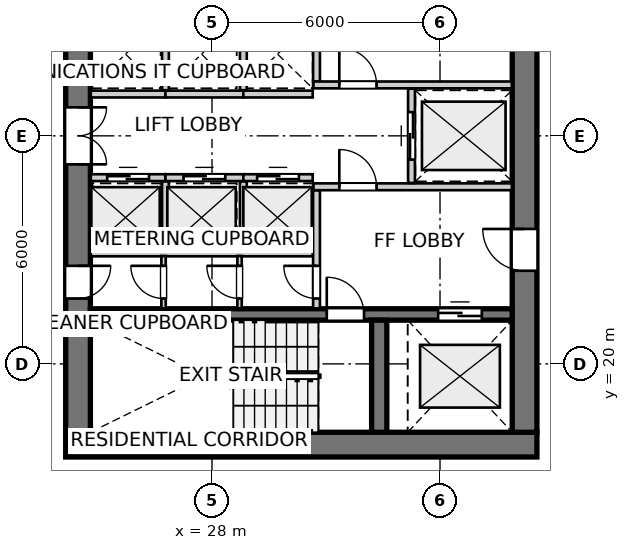
"""IFC4 building model, lengths in metres.
Left out: names, types, materials, properties, quantities, classifications, styles, units other than length and angle.
Written with IfcOpenShell. Run it as: python <this file> out.ifc"""

import sys

from ifc_helpers import new_model, si_unit, direction, frame, frame_2d, origin, place, context, subcontext, project, spatial, rectangle, extrude, source, transform, mapped, element, fill, save


model = new_model("IFC4")
c1 = context("Model", 3, precision=1e-05, world=origin(), true_north=direction((0.0, 1.0)))
c2 = subcontext(c1, "Body", "Model", "MODEL_VIEW")
j1 = project(units=[si_unit("LENGTHUNIT", "METRE"), si_unit("PLANEANGLEUNIT", "RADIAN")], contexts=[c1])
p1 = place(None, origin())
s1 = spatial("IfcSite", under=j1, at=p1, CompositionType="ELEMENT")
p2 = place(p1, origin())
s2 = spatial("IfcBuilding", under=s1, at=p2, CompositionType="ELEMENT")
p3 = place(p2, frame((0.0, 0.0, 89.6)))
s3 = spatial("IfcBuildingStorey", under=s2, at=p3, CompositionType="ELEMENT", Elevation=89.6)
p4 = place(p3, frame((24.15, 17.875, 0.0), z_axis=(0.0, 0.0, 1.0), x_axis=(1.0, 0.0, 0.0)))
e1 = element("IfcWall", 1, at=p4, inside=s3, PredefinedType="SHEAR", context=c2, shape_type="SweptSolid", body=[
    extrude(rectangle(XDim=12.4, YDim=0.65, at=frame_2d((6.2, 0.0))), origin(), (0.0, 0.0, 1.0), 2.95),
])
p5 = place(p3, frame((24.475, 33.8, 0.0), z_axis=(0.0, 0.0, 1.0), x_axis=(0.0, -1.0, 0.0)))
e2 = element("IfcWall", 2, at=p5, inside=s3, PredefinedType="SHEAR", context=c2, shape_type="SweptSolid", body=[
    extrude(rectangle(XDim=15.6, YDim=0.65, at=frame_2d((7.8, 0.0))), origin(), (0.0, 0.0, 1.0), 2.95),
])
p6 = place(p5, frame((7.05, 0.0, 0.0)))
e3 = element("IfcOpeningElement", 3, at=p6, cuts=e2, PredefinedType="OPENING", context=c2, shape_type="SweptSolid", body=[
    extrude(rectangle(XDim=1.5, YDim=2.15, at=frame_2d((0.75, 1.075))), frame((0.0, 0.335, 0.0), z_axis=(0.0, -1.0, 0.0), x_axis=(1.0, 0.0, 0.0)), (0.0, 0.0, 1.0), 0.67),
])
p7 = place(p5, frame((3.52, 0.0, 0.0)))
e4 = element("IfcOpeningElement", 4, at=p7, cuts=e2, PredefinedType="OPENING", context=c2, shape_type="SweptSolid", body=[
    extrude(rectangle(XDim=0.86, YDim=2.05, at=frame_2d((0.43, 1.025))), frame((0.0, 0.335, 0.0), z_axis=(0.0, -1.0, 0.0), x_axis=(1.0, 0.0, 0.0)), (0.0, 0.0, 1.0), 0.67),
])
p8 = place(p5, frame((11.22, 0.0, 0.0)))
e5 = element("IfcOpeningElement", 5, at=p8, cuts=e2, PredefinedType="OPENING", context=c2, shape_type="SweptSolid", body=[
    extrude(rectangle(XDim=0.86, YDim=2.05, at=frame_2d((0.43, 1.025))), frame((0.0, 0.335, 0.0), z_axis=(0.0, -1.0, 0.0), x_axis=(1.0, 0.0, 0.0)), (0.0, 0.0, 1.0), 0.67),
])
p9 = place(p3, frame((36.225, 18.2, 0.0), z_axis=(0.0, 0.0, 1.0), x_axis=(0.0, 1.0, 0.0)))
e6 = element("IfcWall", 6, at=p9, inside=s3, PredefinedType="SHEAR", context=c2, shape_type="SweptSolid", body=[
    extrude(rectangle(XDim=15.6, YDim=0.65, at=frame_2d((7.8, 0.0))), origin(), (0.0, 0.0, 1.0), 2.95),
])
p10 = place(p9, frame((4.25, 0.0, 0.0)))
e7 = element("IfcOpeningElement", 7, at=p10, cuts=e6, PredefinedType="OPENING", context=c2, shape_type="SweptSolid", body=[
    extrude(rectangle(XDim=1.1, YDim=2.15, at=frame_2d((0.55, 1.075))), frame((0.0, 0.335, 0.0), z_axis=(0.0, -1.0, 0.0), x_axis=(1.0, 0.0, 0.0)), (0.0, 0.0, 1.0), 0.67),
])
p11 = place(p9, frame((10.25, 0.0, 0.0)))
e8 = element("IfcOpeningElement", 8, at=p11, cuts=e6, PredefinedType="OPENING", context=c2, shape_type="SweptSolid", body=[
    extrude(rectangle(XDim=1.1, YDim=2.15, at=frame_2d((0.55, 1.075))), frame((0.0, 0.335, 0.0), z_axis=(0.0, -1.0, 0.0), x_axis=(1.0, 0.0, 0.0)), (0.0, 0.0, 1.0), 0.67),
])
p12 = place(p3, frame((24.8, 21.3, 0.0), z_axis=(0.0, 0.0, 1.0), x_axis=(1.0, 0.0, 0.0)))
e9 = element("IfcWall", 9, at=p12, inside=s3, PredefinedType="SHEAR", context=c2, shape_type="SweptSolid", body=[
    extrude(rectangle(XDim=11.1, YDim=0.3, at=frame_2d((5.55, 0.0))), origin(), (0.0, 0.0, 1.0), 2.95),
])
p13 = place(p12, frame((6.22, 0.0, 0.0)))
e10 = element("IfcOpeningElement", 10, at=p13, cuts=e9, PredefinedType="OPENING", context=c2, shape_type="SweptSolid", body=[
    extrude(rectangle(XDim=0.98, YDim=2.15, at=frame_2d((0.49, 1.075))), frame((0.0, 0.16, 0.0), z_axis=(0.0, -1.0, 0.0), x_axis=(1.0, 0.0, 0.0)), (0.0, 0.0, 1.0), 0.32),
])
p14 = place(p12, frame((9.15, 0.0, 0.0)))
e11 = element("IfcOpeningElement", 11, at=p14, cuts=e9, PredefinedType="OPENING", context=c2, shape_type="SweptSolid", body=[
    extrude(rectangle(XDim=1.15, YDim=2.15, at=frame_2d((0.575, 1.075))), frame((0.0, 0.16, 0.0), z_axis=(0.0, -1.0, 0.0), x_axis=(1.0, 0.0, 0.0)), (0.0, 0.0, 1.0), 0.32),
])
p15 = place(p3, frame((32.4, 18.2, 0.0), z_axis=(0.0, 0.0, 1.0), x_axis=(0.0, 1.0, 0.0)))
e12 = element("IfcWall", 12, at=p15, inside=s3, PredefinedType="SHEAR", context=c2, shape_type="SweptSolid", body=[
    extrude(rectangle(XDim=2.95, YDim=0.4, at=frame_2d((1.475, 0.0))), origin(), (0.0, 0.0, 1.0), 2.95),
])
p16 = place(p3, frame((30.75, 21.46, 0.0), z_axis=(0.0, 0.0, 1.0), x_axis=(0.0, 1.0, 0.0)))
e13 = element("IfcWall", 13, at=p16, inside=s3, PredefinedType="PARTITIONING", context=c2, shape_type="SweptSolid", body=[
    extrude(rectangle(XDim=3.11, YDim=0.18, at=frame_2d((1.555, 0.0))), origin(), (0.0, 0.0, 1.0), 2.95),
])
p17 = place(p16, frame((0.26, 0.0, 0.0)))
e14 = element("IfcOpeningElement", 14, at=p17, cuts=e13, PredefinedType="OPENING", context=c2, shape_type="SweptSolid", body=[
    extrude(rectangle(XDim=0.86, YDim=2.05, at=frame_2d((0.43, 1.025))), frame((0.0, 0.1, 0.0), z_axis=(0.0, -1.0, 0.0), x_axis=(1.0, 0.0, 0.0)), (0.0, 0.0, 1.0), 0.2),
])
p18 = place(p3, frame((30.67, 24.66, 0.0), z_axis=(0.0, 0.0, 1.0), x_axis=(1.0, 0.0, 0.0)))
e15 = element("IfcWall", 15, at=p18, inside=s3, PredefinedType="PARTITIONING", context=c2, shape_type="SweptSolid", body=[
    extrude(rectangle(XDim=5.22, YDim=0.18, at=frame_2d((2.61, 0.0))), origin(), (0.0, 0.0, 1.0), 2.95),
])
p19 = place(p18, frame((0.68, 0.0, 0.0)))
e16 = element("IfcOpeningElement", 16, at=p19, cuts=e15, PredefinedType="OPENING", context=c2, shape_type="SweptSolid", body=[
    extrude(rectangle(XDim=0.98, YDim=2.15, at=frame_2d((0.49, 1.075))), frame((0.0, 0.1, 0.0), z_axis=(0.0, -1.0, 0.0), x_axis=(1.0, 0.0, 0.0)), (0.0, 0.0, 1.0), 0.2),
])
p20 = place(p3, frame((30.75, 27.43, 0.0), z_axis=(0.0, 0.0, 1.0), x_axis=(0.0, 1.0, 0.0)))
e17 = element("IfcWall", 17, at=p20, inside=s3, PredefinedType="PARTITIONING", context=c2, shape_type="SweptSolid", body=[
    extrude(rectangle(XDim=3.11, YDim=0.18, at=frame_2d((1.555, 0.0))), origin(), (0.0, 0.0, 1.0), 2.95),
])
p21 = place(p20, frame((1.98, 0.0, 0.0)))
e18 = element("IfcOpeningElement", 18, at=p21, cuts=e17, PredefinedType="OPENING", context=c2, shape_type="SweptSolid", body=[
    extrude(rectangle(XDim=0.86, YDim=2.05, at=frame_2d((0.43, 1.025))), frame((0.0, 0.1, 0.0), z_axis=(0.0, -1.0, 0.0), x_axis=(1.0, 0.0, 0.0)), (0.0, 0.0, 1.0), 0.2),
])
p22 = place(p3, frame((30.67, 27.34, 0.0), z_axis=(0.0, 0.0, 1.0), x_axis=(1.0, 0.0, 0.0)))
e19 = element("IfcWall", 19, at=p22, inside=s3, PredefinedType="PARTITIONING", context=c2, shape_type="SweptSolid", body=[
    extrude(rectangle(XDim=5.22, YDim=0.18, at=frame_2d((2.61, 0.0))), origin(), (0.0, 0.0, 1.0), 2.95),
])
p23 = place(p22, frame((0.68, 0.0, 0.0)))
e20 = element("IfcOpeningElement", 20, at=p23, cuts=e19, PredefinedType="OPENING", context=c2, shape_type="SweptSolid", body=[
    extrude(rectangle(XDim=0.98, YDim=2.15, at=frame_2d((0.49, 1.075))), frame((0.0, 0.1, 0.0), z_axis=(0.0, -1.0, 0.0), x_axis=(1.0, 0.0, 0.0)), (0.0, 0.0, 1.0), 0.2),
])
p24 = place(p3, frame((33.25, 24.76, 0.0), z_axis=(0.0, 0.0, 1.0), x_axis=(0.0, 1.0, 0.0)))
e21 = element("IfcWall", 21, at=p24, inside=s3, PredefinedType="PARTITIONING", context=c2, shape_type="SweptSolid", body=[
    extrude(rectangle(XDim=2.48, YDim=0.18, at=frame_2d((1.24, 0.0))), origin(), (0.0, 0.0, 1.0), 2.95),
])
p25 = place(p24, frame((0.615, 0.0, 0.0)))
e22 = element("IfcOpeningElement", 22, at=p25, cuts=e21, PredefinedType="OPENING", context=c2, shape_type="SweptSolid", body=[
    extrude(rectangle(XDim=1.25, YDim=2.15, at=frame_2d((0.625, 1.075))), frame((0.0, 0.1, 0.0), z_axis=(0.0, -1.0, 0.0), x_axis=(1.0, 0.0, 0.0)), (0.0, 0.0, 1.0), 0.2),
])
p26 = place(p3, frame((24.81, 22.92, 0.0), z_axis=(0.0, 0.0, 1.0), x_axis=(1.0, 0.0, 0.0)))
e23 = element("IfcWall", 23, at=p26, inside=s3, PredefinedType="PARTITIONING", context=c2, shape_type="SweptSolid", body=[
    extrude(rectangle(XDim=5.84, YDim=0.18, at=frame_2d((2.92, 0.0))), origin(), (0.0, 0.0, 1.0), 2.95),
])
p27 = place(p3, frame((24.81, 24.9, 0.0), z_axis=(0.0, 0.0, 1.0), x_axis=(1.0, 0.0, 0.0)))
e24 = element("IfcWall", 24, at=p27, inside=s3, PredefinedType="PARTITIONING", context=c2, shape_type="SweptSolid", body=[
    extrude(rectangle(XDim=1.965, YDim=0.18, at=frame_2d((0.982, 0.0))), origin(), (0.0, 0.0, 1.0), 2.95),
])
p28 = place(p27, frame((0.433, 0.0, 0.0)))
e25 = element("IfcOpeningElement", 25, at=p28, cuts=e24, PredefinedType="OPENING", context=c2, shape_type="SweptSolid", body=[
    extrude(rectangle(XDim=1.1, YDim=2.15, at=frame_2d((0.55, 1.075))), frame((0.0, 0.1, 0.0), z_axis=(0.0, -1.0, 0.0), x_axis=(1.0, 0.0, 0.0)), (0.0, 0.0, 1.0), 0.2),
])
p29 = place(p3, frame((26.775, 24.9, 0.0), z_axis=(0.0, 0.0, 1.0), x_axis=(1.0, 0.0, 0.0)))
e26 = element("IfcWall", 26, at=p29, inside=s3, PredefinedType="PARTITIONING", context=c2, shape_type="SweptSolid", body=[
    extrude(rectangle(XDim=2.05, YDim=0.18, at=frame_2d((1.025, 0.0))), origin(), (0.0, 0.0, 1.0), 2.95),
])
p30 = place(p29, frame((0.475, 0.0, 0.0)))
e27 = element("IfcOpeningElement", 27, at=p30, cuts=e26, PredefinedType="OPENING", context=c2, shape_type="SweptSolid", body=[
    extrude(rectangle(XDim=1.1, YDim=2.15, at=frame_2d((0.55, 1.075))), frame((0.0, 0.1, 0.0), z_axis=(0.0, -1.0, 0.0), x_axis=(1.0, 0.0, 0.0)), (0.0, 0.0, 1.0), 0.2),
])
p31 = place(p3, frame((26.775, 23.02, 0.0), z_axis=(0.0, 0.0, 1.0), x_axis=(0.0, 1.0, 0.0)))
e28 = element("IfcWall", 28, at=p31, inside=s3, PredefinedType="PARTITIONING", context=c2, shape_type="SweptSolid", body=[
    extrude(rectangle(XDim=1.78, YDim=0.18, at=frame_2d((0.89, 0.0))), origin(), (0.0, 0.0, 1.0), 2.95),
])
p32 = place(p3, frame((28.825, 24.9, 0.0), z_axis=(0.0, 0.0, 1.0), x_axis=(1.0, 0.0, 0.0)))
e29 = element("IfcWall", 29, at=p32, inside=s3, PredefinedType="PARTITIONING", context=c2, shape_type="SweptSolid", body=[
    extrude(rectangle(XDim=1.825, YDim=0.18, at=frame_2d((0.913, 0.0))), origin(), (0.0, 0.0, 1.0), 2.95),
])
p33 = place(p32, frame((0.363, 0.0, 0.0)))
e30 = element("IfcOpeningElement", 30, at=p33, cuts=e29, PredefinedType="OPENING", context=c2, shape_type="SweptSolid", body=[
    extrude(rectangle(XDim=1.1, YDim=2.15, at=frame_2d((0.55, 1.075))), frame((0.0, 0.1, 0.0), z_axis=(0.0, -1.0, 0.0), x_axis=(1.0, 0.0, 0.0)), (0.0, 0.0, 1.0), 0.2),
])
p34 = place(p3, frame((28.825, 23.02, 0.0), z_axis=(0.0, 0.0, 1.0), x_axis=(0.0, 1.0, 0.0)))
e31 = element("IfcWall", 31, at=p34, inside=s3, PredefinedType="PARTITIONING", context=c2, shape_type="SweptSolid", body=[
    extrude(rectangle(XDim=1.78, YDim=0.18, at=frame_2d((0.89, 0.0))), origin(), (0.0, 0.0, 1.0), 2.95),
])
p35 = place(p3, frame((24.81, 27.1, 0.0), z_axis=(0.0, 0.0, 1.0), x_axis=(1.0, 0.0, 0.0)))
e32 = element("IfcWall", 32, at=p35, inside=s3, PredefinedType="PARTITIONING", context=c2, shape_type="SweptSolid", body=[
    extrude(rectangle(XDim=1.965, YDim=0.18, at=frame_2d((0.982, 0.0))), origin(), (0.0, 0.0, 1.0), 2.95),
])
p36 = place(p3, frame((26.775, 27.1, 0.0), z_axis=(0.0, 0.0, 1.0), x_axis=(1.0, 0.0, 0.0)))
e33 = element("IfcWall", 33, at=p36, inside=s3, PredefinedType="PARTITIONING", context=c2, shape_type="SweptSolid", body=[
    extrude(rectangle(XDim=2.05, YDim=0.18, at=frame_2d((1.025, 0.0))), origin(), (0.0, 0.0, 1.0), 2.95),
])
p37 = place(p3, frame((26.775, 27.2, 0.0), z_axis=(0.0, 0.0, 1.0), x_axis=(0.0, 1.0, 0.0)))
e34 = element("IfcWall", 34, at=p37, inside=s3, PredefinedType="PARTITIONING", context=c2, shape_type="SweptSolid", body=[
    extrude(rectangle(XDim=1.78, YDim=0.18, at=frame_2d((0.89, 0.0))), origin(), (0.0, 0.0, 1.0), 2.95),
])
p38 = place(p3, frame((28.825, 27.1, 0.0), z_axis=(0.0, 0.0, 1.0), x_axis=(1.0, 0.0, 0.0)))
e35 = element("IfcWall", 35, at=p38, inside=s3, PredefinedType="PARTITIONING", context=c2, shape_type="SweptSolid", body=[
    extrude(rectangle(XDim=1.825, YDim=0.18, at=frame_2d((0.913, 0.0))), origin(), (0.0, 0.0, 1.0), 2.95),
])
p39 = place(p3, frame((28.825, 27.2, 0.0), z_axis=(0.0, 0.0, 1.0), x_axis=(0.0, 1.0, 0.0)))
e36 = element("IfcWall", 36, at=p39, inside=s3, PredefinedType="PARTITIONING", context=c2, shape_type="SweptSolid", body=[
    extrude(rectangle(XDim=1.78, YDim=0.18, at=frame_2d((0.89, 0.0))), origin(), (0.0, 0.0, 1.0), 2.95),
])
p40 = place(p3, frame((26.725, 21.46, 0.0), z_axis=(0.0, 0.0, 1.0), x_axis=(0.0, 1.0, 0.0)))
e37 = element("IfcWall", 37, at=p40, inside=s3, PredefinedType="PARTITIONING", context=c2, shape_type="SweptSolid", body=[
    extrude(rectangle(XDim=1.38, YDim=0.115, at=frame_2d((0.69, 0.0))), origin(), (0.0, 0.0, 1.0), 2.95),
])
p41 = place(p40, frame((0.26, 0.0, 0.0)))
e38 = element("IfcOpeningElement", 38, at=p41, cuts=e37, PredefinedType="OPENING", context=c2, shape_type="SweptSolid", body=[
    extrude(rectangle(XDim=0.86, YDim=2.05, at=frame_2d((0.43, 1.025))), frame((0.0, 0.067, 0.0), z_axis=(0.0, -1.0, 0.0), x_axis=(1.0, 0.0, 0.0)), (0.0, 0.0, 1.0), 0.135),
])
p42 = place(p3, frame((28.725, 21.46, 0.0), z_axis=(0.0, 0.0, 1.0), x_axis=(0.0, 1.0, 0.0)))
e39 = element("IfcWall", 39, at=p42, inside=s3, PredefinedType="PARTITIONING", context=c2, shape_type="SweptSolid", body=[
    extrude(rectangle(XDim=1.38, YDim=0.115, at=frame_2d((0.69, 0.0))), origin(), (0.0, 0.0, 1.0), 2.95),
])
p43 = place(p42, frame((0.26, 0.0, 0.0)))
e40 = element("IfcOpeningElement", 40, at=p43, cuts=e39, PredefinedType="OPENING", context=c2, shape_type="SweptSolid", body=[
    extrude(rectangle(XDim=0.86, YDim=2.05, at=frame_2d((0.43, 1.025))), frame((0.0, 0.067, 0.0), z_axis=(0.0, -1.0, 0.0), x_axis=(1.0, 0.0, 0.0)), (0.0, 0.0, 1.0), 0.135),
])
m1 = source(origin(), c2, "Body", "SweptSolid", [
    extrude(rectangle(XDim=0.98, YDim=2.15, at=frame_2d((0.49, 1.075))), frame((0.0, 0.025, 0.0), z_axis=(0.0, -1.0, 0.0), x_axis=(1.0, 0.0, 0.0)), (0.0, 0.0, 1.0), 0.05),
])
p44 = place(p13, origin())
e41 = element("IfcDoor", 41, at=p44, inside=s3, OperationType="SINGLE_SWING_LEFT", PredefinedType="DOOR", context=c2, shape_type="MappedRepresentation", body=[
    mapped(m1, transform((0.0, 0.0, 0.0), x_axis=(1.0, 0.0, 0.0), y_axis=(0.0, 1.0, 0.0), z_axis=(0.0, 0.0, 1.0), scale=1.0)),
])
fill(e10, e41)
m2 = source(origin(), c2, "Body", "SweptSolid", [
    extrude(rectangle(XDim=1.15, YDim=2.15, at=frame_2d((0.575, 1.075))), frame((0.0, 0.025, 0.0), z_axis=(0.0, -1.0, 0.0), x_axis=(1.0, 0.0, 0.0)), (0.0, 0.0, 1.0), 0.05),
])
p45 = place(p14, origin())
e42 = element("IfcDoor", 42, at=p45, inside=s3, OperationType="DOUBLE_DOOR_SLIDING", PredefinedType="DOOR", context=c2, shape_type="MappedRepresentation", body=[
    mapped(m2, transform((0.0, 0.0, 0.0), x_axis=(1.0, 0.0, 0.0), y_axis=(0.0, 1.0, 0.0), z_axis=(0.0, 0.0, 1.0), scale=1.0)),
])
fill(e11, e42)
m3 = source(origin(), c2, "Body", "SweptSolid", [
    extrude(rectangle(XDim=1.1, YDim=2.15, at=frame_2d((0.55, 1.075))), frame((0.0, 0.025, 0.0), z_axis=(0.0, -1.0, 0.0), x_axis=(1.0, 0.0, 0.0)), (0.0, 0.0, 1.0), 0.05),
])
p46 = place(p10, origin())
e43 = element("IfcDoor", 43, at=p46, inside=s3, OperationType="SINGLE_SWING_RIGHT", PredefinedType="DOOR", context=c2, shape_type="MappedRepresentation", body=[
    mapped(m3, transform((0.0, 0.0, 0.0), x_axis=(1.0, 0.0, 0.0), y_axis=(0.0, 1.0, 0.0), z_axis=(0.0, 0.0, 1.0), scale=1.0)),
])
fill(e7, e43)
m4 = source(origin(), c2, "Body", "SweptSolid", [
    extrude(rectangle(XDim=1.5, YDim=2.15, at=frame_2d((0.75, 1.075))), frame((0.0, 0.025, 0.0), z_axis=(0.0, -1.0, 0.0), x_axis=(1.0, 0.0, 0.0)), (0.0, 0.0, 1.0), 0.05),
])
p47 = place(p6, origin())
e44 = element("IfcDoor", 44, at=p47, inside=s3, OperationType="DOUBLE_DOOR_SINGLE_SWING", PredefinedType="DOOR", context=c2, shape_type="MappedRepresentation", body=[
    mapped(m4, transform((0.0, 0.0, 0.0), x_axis=(1.0, 0.0, 0.0), y_axis=(0.0, 1.0, 0.0), z_axis=(0.0, 0.0, 1.0), scale=1.0)),
])
fill(e3, e44)
m5 = source(origin(), c2, "Body", "SweptSolid", [
    extrude(rectangle(XDim=0.86, YDim=2.05, at=frame_2d((0.43, 1.025))), frame((0.0, 0.025, 0.0), z_axis=(0.0, -1.0, 0.0), x_axis=(1.0, 0.0, 0.0)), (0.0, 0.0, 1.0), 0.05),
])
p48 = place(p8, origin())
e45 = element("IfcDoor", 45, at=p48, inside=s3, OperationType="SINGLE_SWING_LEFT", PredefinedType="DOOR", context=c2, shape_type="MappedRepresentation", body=[
    mapped(m5, transform((0.0, 0.0, 0.0), x_axis=(1.0, 0.0, 0.0), y_axis=(0.0, 1.0, 0.0), z_axis=(0.0, 0.0, 1.0), scale=1.0)),
])
fill(e5, e45)
p49 = place(p17, origin())
e46 = element("IfcDoor", 46, at=p49, inside=s3, OperationType="SINGLE_SWING_RIGHT", PredefinedType="DOOR", context=c2, shape_type="MappedRepresentation", body=[
    mapped(m5, transform((0.0, 0.0, 0.0), x_axis=(1.0, 0.0, 0.0), y_axis=(0.0, 1.0, 0.0), z_axis=(0.0, 0.0, 1.0), scale=1.0)),
])
fill(e14, e46)
p50 = place(p19, origin())
e47 = element("IfcDoor", 47, at=p50, inside=s3, OperationType="SINGLE_SWING_LEFT", PredefinedType="DOOR", context=c2, shape_type="MappedRepresentation", body=[
    mapped(m1, transform((0.0, 0.0, 0.0), x_axis=(1.0, 0.0, 0.0), y_axis=(0.0, 1.0, 0.0), z_axis=(0.0, 0.0, 1.0), scale=1.0)),
])
fill(e16, e47)
p51 = place(p23, origin())
e48 = element("IfcDoor", 48, at=p51, inside=s3, OperationType="SINGLE_SWING_LEFT", PredefinedType="DOOR", context=c2, shape_type="MappedRepresentation", body=[
    mapped(m1, transform((0.0, 0.0, 0.0), x_axis=(1.0, 0.0, 0.0), y_axis=(0.0, 1.0, 0.0), z_axis=(0.0, 0.0, 1.0), scale=1.0)),
])
fill(e20, e48)
m6 = source(origin(), c2, "Body", "SweptSolid", [
    extrude(rectangle(XDim=1.25, YDim=2.15, at=frame_2d((0.625, 1.075))), frame((0.0, 0.025, 0.0), z_axis=(0.0, -1.0, 0.0), x_axis=(1.0, 0.0, 0.0)), (0.0, 0.0, 1.0), 0.05),
])
p52 = place(p25, origin())
e49 = element("IfcDoor", 49, at=p52, inside=s3, OperationType="DOUBLE_DOOR_SLIDING", PredefinedType="DOOR", context=c2, shape_type="MappedRepresentation", body=[
    mapped(m6, transform((0.0, 0.0, 0.0), x_axis=(1.0, 0.0, 0.0), y_axis=(0.0, 1.0, 0.0), z_axis=(0.0, 0.0, 1.0), scale=1.0)),
])
fill(e22, e49)
p53 = place(p28, origin())
e50 = element("IfcDoor", 50, at=p53, inside=s3, OperationType="DOUBLE_DOOR_SLIDING", PredefinedType="DOOR", context=c2, shape_type="MappedRepresentation", body=[
    mapped(m3, transform((0.0, 0.0, 0.0), x_axis=(1.0, 0.0, 0.0), y_axis=(0.0, 1.0, 0.0), z_axis=(0.0, 0.0, 1.0), scale=1.0)),
])
fill(e25, e50)
p54 = place(p30, origin())
e51 = element("IfcDoor", 51, at=p54, inside=s3, OperationType="DOUBLE_DOOR_SLIDING", PredefinedType="DOOR", context=c2, shape_type="MappedRepresentation", body=[
    mapped(m3, transform((0.0, 0.0, 0.0), x_axis=(1.0, 0.0, 0.0), y_axis=(0.0, 1.0, 0.0), z_axis=(0.0, 0.0, 1.0), scale=1.0)),
])
fill(e27, e51)
p55 = place(p33, origin())
e52 = element("IfcDoor", 52, at=p55, inside=s3, OperationType="DOUBLE_DOOR_SLIDING", PredefinedType="DOOR", context=c2, shape_type="MappedRepresentation", body=[
    mapped(m3, transform((0.0, 0.0, 0.0), x_axis=(1.0, 0.0, 0.0), y_axis=(0.0, 1.0, 0.0), z_axis=(0.0, 0.0, 1.0), scale=1.0)),
])
fill(e30, e52)
p56 = place(p41, origin())
e53 = element("IfcDoor", 53, at=p56, inside=s3, OperationType="SINGLE_SWING_RIGHT", PredefinedType="DOOR", context=c2, shape_type="MappedRepresentation", body=[
    mapped(m5, transform((0.0, 0.0, 0.0), x_axis=(1.0, 0.0, 0.0), y_axis=(0.0, 1.0, 0.0), z_axis=(0.0, 0.0, 1.0), scale=1.0)),
])
fill(e38, e53)
p57 = place(p43, origin())
e54 = element("IfcDoor", 54, at=p57, inside=s3, OperationType="SINGLE_SWING_RIGHT", PredefinedType="DOOR", context=c2, shape_type="MappedRepresentation", body=[
    mapped(m5, transform((0.0, 0.0, 0.0), x_axis=(1.0, 0.0, 0.0), y_axis=(0.0, 1.0, 0.0), z_axis=(0.0, 0.0, 1.0), scale=1.0)),
])
fill(e40, e54)
save(model, sys.argv[1])
